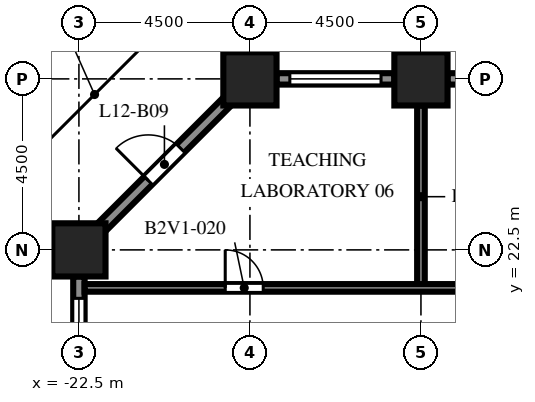
"""IFC4 building model, lengths in metres.
Left out: names, types, materials, properties, quantities, classifications, styles, units other than length and angle.
Written with IfcOpenShell. Run it as: python <this file> out.ifc"""

import sys

from ifc_helpers import new_model, si_unit, direction, frame, frame_2d, origin, origin_2d, place, context, subcontext, project, spatial, rectangle, extrude, element, fill, save


model = new_model("IFC4")
c1 = context("Model", 3, precision=1e-05, world=origin(), true_north=direction((0.0, 1.0)))
c2 = subcontext(c1, "Body", "Model", "MODEL_VIEW")
j1 = project(units=[si_unit("LENGTHUNIT", "METRE"), si_unit("PLANEANGLEUNIT", "RADIAN")], contexts=[c1])
p1 = place(None, origin())
s1 = spatial("IfcSite", under=j1, at=p1, CompositionType="ELEMENT")
p2 = place(p1, origin())
s2 = spatial("IfcBuilding", under=s1, at=p2, CompositionType="ELEMENT")
p3 = place(p2, frame((0.0, 0.0, 54.2)))
s3 = spatial("IfcBuildingStorey", under=s2, at=p3, CompositionType="ELEMENT", Elevation=54.2)
for number, where, z_axis, x_axis in (
    (1, (-22.5, 22.5, 0.0), (0.0, 0.0, 1.0), (1.0, 0.0, 0.0)),
    (2, (-18.0, 27.0, 0.0), (0.0, 0.0, 1.0), (1.0, 0.0, 0.0)),
    (3, (-13.5, 27.0, 0.0), (0.0, 0.0, 1.0), (1.0, 0.0, 0.0)),
):
    element("IfcColumn", number, at=place(p3, frame(where, z_axis=z_axis, x_axis=x_axis)), inside=s3, PredefinedType="COLUMN", context=c2, shape_type="SweptSolid", body=[
        extrude(rectangle(XDim=1.4, YDim=1.4, at=origin_2d()), origin(), (0.0, 0.0, 1.0), 4.1),
    ])
p4 = place(p3, frame((-12.8, 27.0, 0.0), z_axis=(0.0, 0.0, 1.0), x_axis=(1.0, 0.0, 0.0)))
e4 = element("IfcWall", 4, at=p4, inside=s3, PredefinedType="SOLIDWALL", context=c2, shape_type="SweptSolid", body=[
    extrude(rectangle(XDim=3.1, YDim=0.3, at=frame_2d((1.55, 0.0))), origin(), (0.0, 0.0, 1.0), 2.75),
])
p5 = place(p4, frame((1.05, 0.0, 0.0)))
e5 = element("IfcOpeningElement", 5, at=p5, cuts=e4, PredefinedType="OPENING", context=c2, shape_type="SweptSolid", body=[
    extrude(rectangle(XDim=1.0, YDim=2.2, at=frame_2d((0.5, 1.1))), frame((0.0, 0.16, 0.0), z_axis=(0.0, -1.0, 0.0), x_axis=(1.0, 0.0, 0.0)), (0.0, 0.0, 1.0), 0.32),
])
p6 = place(p3, frame((-17.3, 27.0, 0.0), z_axis=(0.0, 0.0, 1.0), x_axis=(1.0, 0.0, 0.0)))
e6 = element("IfcWall", 6, at=p6, inside=s3, PredefinedType="SOLIDWALL", context=c2, shape_type="SweptSolid", body=[
    extrude(rectangle(XDim=3.1, YDim=0.3, at=frame_2d((1.55, 0.0))), origin(), (0.0, 0.0, 1.0), 2.75),
])
p7 = place(p6, frame((0.35, 0.0, 0.8)))
e7 = element("IfcOpeningElement", 7, at=p7, cuts=e6, PredefinedType="OPENING", context=c2, shape_type="SweptSolid", body=[
    extrude(rectangle(XDim=2.4, YDim=1.7, at=frame_2d((1.2, 0.85))), frame((0.0, 0.16, 0.0), z_axis=(0.0, -1.0, 0.0), x_axis=(1.0, 0.0, 0.0)), (0.0, 0.0, 1.0), 0.32),
])
p8 = place(p3, frame((-21.906, 23.094, 0.0), z_axis=(0.0, 0.0, 1.0), x_axis=(0.707106781187, 0.707106781187, 0.0)))
e8 = element("IfcWall", 8, at=p8, inside=s3, PredefinedType="SOLIDWALL", context=c2, shape_type="SweptSolid", body=[
    extrude(rectangle(XDim=4.684, YDim=0.3, at=frame_2d((2.342, 0.0))), origin(), (0.0, 0.0, 1.0), 2.75),
])
p9 = place(p8, frame((1.742, 0.0, 0.0)))
e9 = element("IfcOpeningElement", 9, at=p9, cuts=e8, PredefinedType="OPENING", context=c2, shape_type="SweptSolid", body=[
    extrude(rectangle(XDim=1.2, YDim=2.2, at=frame_2d((0.6, 1.1))), frame((0.0, 0.16, 0.0), z_axis=(0.0, -1.0, 0.0), x_axis=(1.0, 0.0, 0.0)), (0.0, 0.0, 1.0), 0.32),
])
p10 = place(p3, frame((-22.5, 18.7, 0.0), z_axis=(0.0, 0.0, 1.0), x_axis=(0.0, 1.0, 0.0)))
e10 = element("IfcWall", 10, at=p10, inside=s3, PredefinedType="SOLIDWALL", context=c2, shape_type="SweptSolid", body=[
    extrude(rectangle(XDim=3.1, YDim=0.3, at=frame_2d((1.55, 0.0))), origin(), (0.0, 0.0, 1.0), 2.75),
])
p11 = place(p10, frame((0.125, 0.0, 0.8)))
e11 = element("IfcOpeningElement", 11, at=p11, cuts=e10, PredefinedType="OPENING", context=c2, shape_type="SweptSolid", body=[
    extrude(rectangle(XDim=2.4, YDim=1.7, at=frame_2d((1.2, 0.85))), frame((0.0, 0.16, 0.0), z_axis=(0.0, -1.0, 0.0), x_axis=(1.0, 0.0, 0.0)), (0.0, 0.0, 1.0), 0.32),
])
p12 = place(p3, frame((-13.5, 21.5, 0.0), z_axis=(0.0, 0.0, 1.0), x_axis=(0.0, 1.0, 0.0)))
e12 = element("IfcWall", 12, at=p12, inside=s3, PredefinedType="PARTITIONING", context=c2, shape_type="SweptSolid", body=[
    extrude(rectangle(XDim=4.8, YDim=0.2, at=frame_2d((2.4, 0.0))), origin(), (0.0, 0.0, 1.0), 3.65),
])
p13 = place(p3, frame((-22.35, 21.5, 0.0), z_axis=(0.0, 0.0, 1.0), x_axis=(1.0, 0.0, 0.0)))
e13 = element("IfcWall", 13, at=p13, inside=s3, PredefinedType="PARTITIONING", context=c2, shape_type="SweptSolid", body=[
    extrude(rectangle(XDim=53.7, YDim=0.2, at=frame_2d((26.85, 0.0))), origin(), (0.0, 0.0, 1.0), 3.65),
])
p14 = place(p13, frame((3.7, 0.0, 0.0)))
e14 = element("IfcOpeningElement", 14, at=p14, cuts=e13, PredefinedType="OPENING", context=c2, shape_type="SweptSolid", body=[
    extrude(rectangle(XDim=1.0, YDim=2.1, at=frame_2d((0.5, 1.05))), frame((0.0, 0.11, 0.0), z_axis=(0.0, -1.0, 0.0), x_axis=(1.0, 0.0, 0.0)), (0.0, 0.0, 1.0), 0.22),
])
p15 = place(p13, frame((14.2, 0.0, 0.0)))
e15 = element("IfcOpeningElement", 15, at=p15, cuts=e13, PredefinedType="OPENING", context=c2, shape_type="SweptSolid", body=[
    extrude(rectangle(XDim=1.0, YDim=2.1, at=frame_2d((0.5, 1.05))), frame((0.0, 0.11, 0.0), z_axis=(0.0, -1.0, 0.0), x_axis=(1.0, 0.0, 0.0)), (0.0, 0.0, 1.0), 0.22),
])
p16 = place(p13, frame((29.45, 0.0, 0.0)))
e16 = element("IfcOpeningElement", 16, at=p16, cuts=e13, PredefinedType="OPENING", context=c2, shape_type="SweptSolid", body=[
    extrude(rectangle(XDim=1.0, YDim=2.1, at=frame_2d((0.5, 1.05))), frame((0.0, 0.11, 0.0), z_axis=(0.0, -1.0, 0.0), x_axis=(1.0, 0.0, 0.0)), (0.0, 0.0, 1.0), 0.22),
])
p17 = place(p13, frame((41.2, 0.0, 0.0)))
e17 = element("IfcOpeningElement", 17, at=p17, cuts=e13, PredefinedType="OPENING", context=c2, shape_type="SweptSolid", body=[
    extrude(rectangle(XDim=1.0, YDim=2.1, at=frame_2d((0.5, 1.05))), frame((0.0, 0.11, 0.0), z_axis=(0.0, -1.0, 0.0), x_axis=(1.0, 0.0, 0.0)), (0.0, 0.0, 1.0), 0.22),
])
p18 = place(p13, frame((48.95, 0.0, 0.0)))
e18 = element("IfcOpeningElement", 18, at=p18, cuts=e13, PredefinedType="OPENING", context=c2, shape_type="SweptSolid", body=[
    extrude(rectangle(XDim=1.0, YDim=2.1, at=frame_2d((0.5, 1.05))), frame((0.0, 0.11, 0.0), z_axis=(0.0, -1.0, 0.0), x_axis=(1.0, 0.0, 0.0)), (0.0, 0.0, 1.0), 0.22),
])
p19 = place(p7, origin())
e19 = element("IfcWindow", 19, at=p19, inside=s3, PartitioningType="SINGLE_PANEL", PredefinedType="WINDOW", context=c2, shape_type="SweptSolid", body=[
    extrude(rectangle(XDim=2.4, YDim=1.7, at=frame_2d((1.2, 0.85))), frame((0.0, 0.03, 0.0), z_axis=(0.0, -1.0, 0.0), x_axis=(1.0, 0.0, 0.0)), (0.0, 0.0, 1.0), 0.06),
])
fill(e7, e19)
p20 = place(p9, origin())
e20 = element("IfcDoor", 20, at=p20, inside=s3, OperationType="SINGLE_SWING_LEFT", PredefinedType="DOOR", context=c2, shape_type="SweptSolid", body=[
    extrude(rectangle(XDim=1.2, YDim=2.2, at=frame_2d((0.6, 1.1))), frame((0.0, 0.025, 0.0), z_axis=(0.0, -1.0, 0.0), x_axis=(1.0, 0.0, 0.0)), (0.0, 0.0, 1.0), 0.05),
])
fill(e9, e20)
p21 = place(p11, origin())
e21 = element("IfcWindow", 21, at=p21, inside=s3, PartitioningType="SINGLE_PANEL", PredefinedType="WINDOW", context=c2, shape_type="SweptSolid", body=[
    extrude(rectangle(XDim=2.4, YDim=1.7, at=frame_2d((1.2, 0.85))), frame((0.0, 0.03, 0.0), z_axis=(0.0, -1.0, 0.0), x_axis=(1.0, 0.0, 0.0)), (0.0, 0.0, 1.0), 0.06),
])
fill(e11, e21)
p22 = place(p14, origin())
e22 = element("IfcDoor", 22, at=p22, inside=s3, OperationType="SINGLE_SWING_LEFT", PredefinedType="DOOR", context=c2, shape_type="SweptSolid", body=[
    extrude(rectangle(XDim=1.0, YDim=2.1, at=frame_2d((0.5, 1.05))), frame((0.0, 0.025, 0.0), z_axis=(0.0, -1.0, 0.0), x_axis=(1.0, 0.0, 0.0)), (0.0, 0.0, 1.0), 0.05),
])
fill(e14, e22)
save(model, sys.argv[1])
